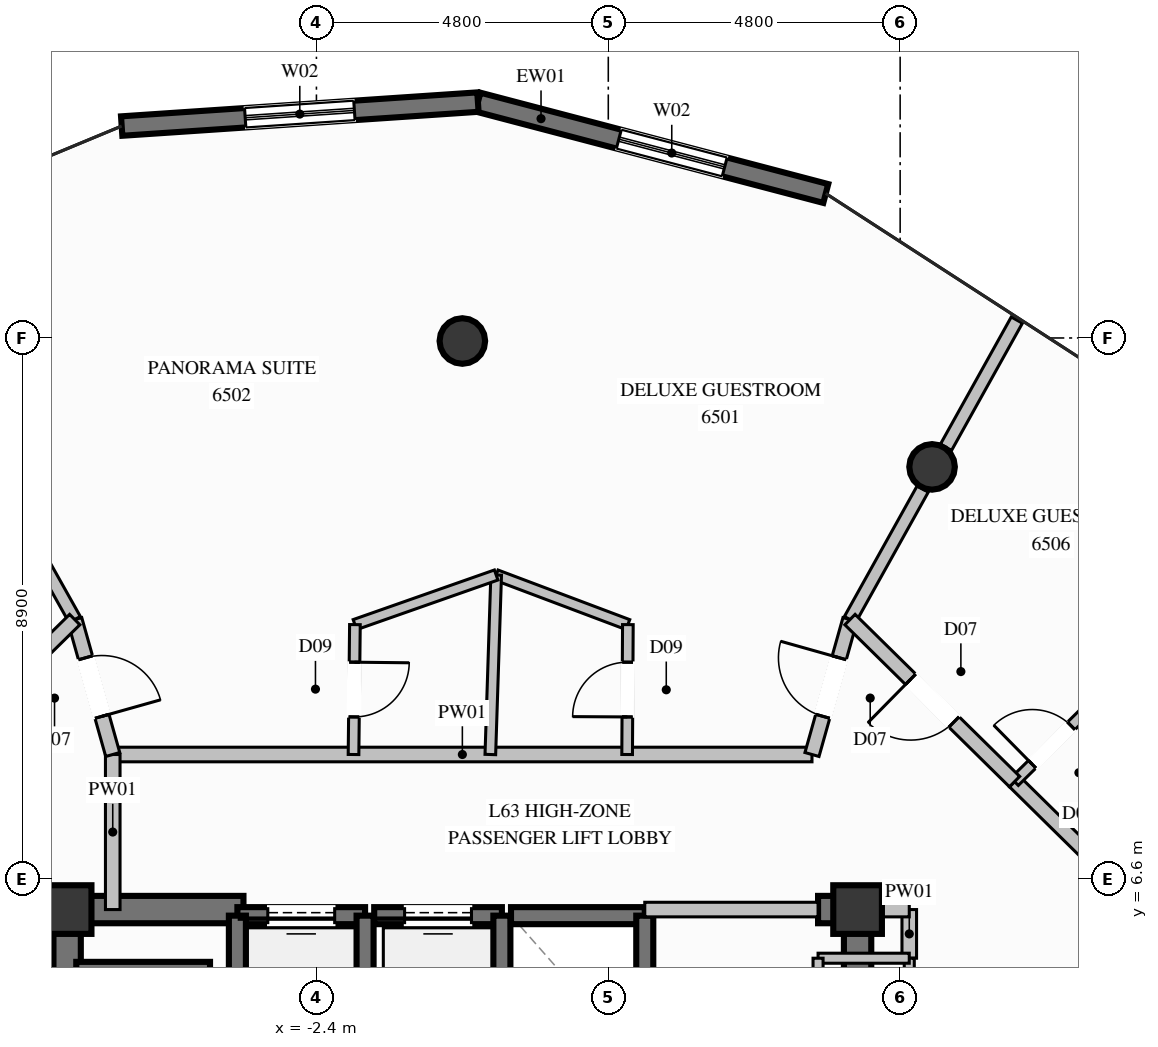
"""IFC4 building model, lengths in metres.
Left out: names, types, materials, properties, quantities, classifications, styles, units other than length and angle.
Written with IfcOpenShell. Run it as: python <this file> out.ifc"""

import sys

from ifc_helpers import new_model, si_unit, direction, frame, frame_2d, origin, origin_2d, place, context, subcontext, project, spatial, rectangle, circle, extrude, element, fill, save


model = new_model("IFC4")
c1 = context("Model", 3, precision=1e-05, world=origin(), true_north=direction((0.0, 1.0)))
c2 = subcontext(c1, "Body", "Model", "MODEL_VIEW")
j1 = project(units=[si_unit("LENGTHUNIT", "METRE"), si_unit("PLANEANGLEUNIT", "RADIAN")], contexts=[c1])
p1 = place(None, origin())
s1 = spatial("IfcSite", under=j1, at=p1, CompositionType="ELEMENT")
p2 = place(p1, origin())
s2 = spatial("IfcBuilding", under=s1, at=p2, CompositionType="ELEMENT")
p3 = place(p2, frame((0.0, 0.0, 243.0)))
s3 = spatial("IfcBuildingStorey", under=s2, at=p3, CompositionType="ELEMENT", Elevation=243.0)
for number, where, z_axis, x_axis in (
    (1, (6.5, 6.1, 0.0), (0.0, 0.0, 1.0), (1.0, 0.0, 0.0)),
    (2, (-6.5, 6.1, 0.0), (0.0, 0.0, 1.0), (1.0, 0.0, 0.0)),
):
    element("IfcColumn", number, at=place(p3, frame(where, z_axis=z_axis, x_axis=x_axis)), inside=s3, PredefinedType="COLUMN", context=c2, shape_type="SweptSolid", body=[
        extrude(rectangle(XDim=0.8, YDim=0.8, at=origin_2d()), origin(), (0.0, 0.0, 1.0), 3.8),
    ])
p4 = place(p3, frame((-6.275, 6.1, 0.0), z_axis=(0.0, 0.0, 1.0), x_axis=(1.0, 0.0, 0.0)))
e3 = element("IfcWall", 3, at=p4, inside=s3, PredefinedType="SHEAR", context=c2, shape_type="SweptSolid", body=[
    extrude(rectangle(XDim=2.675, YDim=0.45, at=frame_2d((1.337, 0.0))), origin(), (0.0, 0.0, 1.0), 3.8),
])
p5 = place(p3, frame((5.85, 6.1, 0.0), z_axis=(0.0, 0.0, 1.0), x_axis=(1.0, 0.0, 0.0)))
e4 = element("IfcWall", 4, at=p5, inside=s3, PredefinedType="SHEAR", context=c2, shape_type="SweptSolid", body=[
    extrude(rectangle(XDim=0.425, YDim=0.45, at=frame_2d((0.212, 0.0))), origin(), (0.0, 0.0, 1.0), 3.8),
])
p6 = place(p3, frame((-6.5, 2.35, 0.0), z_axis=(0.0, 0.0, 1.0), x_axis=(0.0, 1.0, 0.0)))
e5 = element("IfcWall", 5, at=p6, inside=s3, PredefinedType="SHEAR", context=c2, shape_type="SweptSolid", body=[
    extrude(rectangle(XDim=3.975, YDim=0.45, at=frame_2d((1.987, 0.0))), origin(), (0.0, 0.0, 1.0), 3.8),
])
p7 = place(p3, frame((6.5, 3.35, 0.0), z_axis=(0.0, 0.0, 1.0), x_axis=(0.0, 1.0, 0.0)))
e6 = element("IfcWall", 6, at=p7, inside=s3, PredefinedType="SHEAR", context=c2, shape_type="SweptSolid", body=[
    extrude(rectangle(XDim=2.975, YDim=0.45, at=frame_2d((1.487, 0.0))), origin(), (0.0, 0.0, 1.0), 3.8),
])
for number, where, z_axis, x_axis in (
    (7, (7.725, 13.38, 0.0), (0.0, 0.0, 1.0), (1.0, 0.0, 0.0)),
    (8, (0.0, 15.45, 0.0), (0.0, 0.0, 1.0), (1.0, 0.0, 0.0)),
):
    element("IfcColumn", number, at=place(p3, frame(where, z_axis=z_axis, x_axis=x_axis)), inside=s3, PredefinedType="COLUMN", context=c2, shape_type="SweptSolid", body=[
        extrude(circle(Radius=0.375, at=origin_2d()), origin(), (0.0, 0.0, 1.0), 3.8),
    ])
p8 = place(p3, frame((0.256, 19.379, 0.0), z_axis=(0.0, 0.0, 1.0), x_axis=(0.967181914063, -0.254084917124, 0.0)))
e9 = element("IfcWall", 9, at=p8, inside=s3, PredefinedType="SOLIDWALL", context=c2, shape_type="SweptSolid", body=[
    extrude(rectangle(XDim=5.915, YDim=0.32, at=frame_2d((2.958, 0.0))), origin(), (0.0, 0.0, 1.0), 3.57),
])
p9 = place(p8, frame((2.396, 0.0, 0.35)))
e10 = element("IfcOpeningElement", 10, at=p9, cuts=e9, PredefinedType="OPENING", context=c2, shape_type="SweptSolid", body=[
    extrude(rectangle(XDim=1.8, YDim=2.6, at=frame_2d((0.9, 1.3))), frame((0.0, 0.17, 0.0), z_axis=(0.0, -1.0, 0.0), x_axis=(1.0, 0.0, 0.0)), (0.0, 0.0, 1.0), 0.34),
])
p10 = place(p3, frame((-5.603, 18.985, 0.0), z_axis=(0.0, 0.0, 1.0), x_axis=(0.997748955427, 0.067059838539, 0.0)))
e11 = element("IfcWall", 11, at=p10, inside=s3, PredefinedType="SOLIDWALL", context=c2, shape_type="SweptSolid", body=[
    extrude(rectangle(XDim=5.872, YDim=0.32, at=frame_2d((2.936, 0.0))), origin(), (0.0, 0.0, 1.0), 3.57),
])
p11 = place(p10, frame((2.036, 0.0, 0.35)))
e12 = element("IfcOpeningElement", 12, at=p11, cuts=e11, PredefinedType="OPENING", context=c2, shape_type="SweptSolid", body=[
    extrude(rectangle(XDim=1.8, YDim=2.6, at=frame_2d((0.9, 1.3))), frame((0.0, 0.17, 0.0), z_axis=(0.0, -1.0, 0.0), x_axis=(1.0, 0.0, 0.0)), (0.0, 0.0, 1.0), 0.34),
])
p12 = place(p3, frame((-1.6, 6.0, 0.0), z_axis=(0.0, 0.0, 1.0), x_axis=(-1.0, 0.0, 0.0)))
e13 = element("IfcWall", 13, at=p12, inside=s3, PredefinedType="SOLIDWALL", context=c2, shape_type="SweptSolid", body=[
    extrude(rectangle(XDim=2.1, YDim=0.28, at=frame_2d((1.05, 0.0))), origin(), (0.0, 0.0, 1.0), 3.57),
])
p13 = place(p12, frame((0.5, 0.0, 0.0)))
e14 = element("IfcOpeningElement", 14, at=p13, cuts=e13, PredefinedType="OPENING", context=c2, shape_type="SweptSolid", body=[
    extrude(rectangle(XDim=1.1, YDim=2.2, at=frame_2d((0.55, 1.1))), frame((0.0, 0.15, 0.0), z_axis=(0.0, -1.0, 0.0), x_axis=(1.0, 0.0, 0.0)), (0.0, 0.0, 1.0), 0.3),
])
for number, where, z_axis, x_axis in (
    (15, (-3.7, 6.0, 0.0), (0.0, 0.0, 1.0), (0.0, -1.0, 0.0)),
    (16, (-1.6, 3.5, 0.0), (0.0, 0.0, 1.0), (0.0, 1.0, 0.0)),
):
    element("IfcWall", number, at=place(p3, frame(where, z_axis=z_axis, x_axis=x_axis)), inside=s3, PredefinedType="SOLIDWALL", context=c2, shape_type="SweptSolid", body=[
        extrude(rectangle(XDim=2.5, YDim=0.28, at=frame_2d((1.25, 0.0))), origin(), (0.0, 0.0, 1.0), 3.57),
    ])
p14 = place(p3, frame((0.65, 6.0, 0.0), z_axis=(0.0, 0.0, 1.0), x_axis=(-1.0, 0.0, 0.0)))
e17 = element("IfcWall", 17, at=p14, inside=s3, PredefinedType="SOLIDWALL", context=c2, shape_type="SweptSolid", body=[
    extrude(rectangle(XDim=2.1, YDim=0.28, at=frame_2d((1.05, 0.0))), origin(), (0.0, 0.0, 1.0), 3.57),
])
p15 = place(p14, frame((0.5, 0.0, 0.0)))
e18 = element("IfcOpeningElement", 18, at=p15, cuts=e17, PredefinedType="OPENING", context=c2, shape_type="SweptSolid", body=[
    extrude(rectangle(XDim=1.1, YDim=2.2, at=frame_2d((0.55, 1.1))), frame((0.0, 0.15, 0.0), z_axis=(0.0, -1.0, 0.0), x_axis=(1.0, 0.0, 0.0)), (0.0, 0.0, 1.0), 0.3),
])
p16 = place(p3, frame((0.65, 3.5, 0.0), z_axis=(0.0, 0.0, 1.0), x_axis=(0.0, 1.0, 0.0)))
e19 = element("IfcWall", 19, at=p16, inside=s3, PredefinedType="SOLIDWALL", context=c2, shape_type="SweptSolid", body=[
    extrude(rectangle(XDim=2.5, YDim=0.28, at=frame_2d((1.25, 0.0))), origin(), (0.0, 0.0, 1.0), 3.57),
])
p17 = place(p3, frame((3.0, 6.0, 0.0), z_axis=(0.0, 0.0, 1.0), x_axis=(-1.0, 0.0, 0.0)))
e20 = element("IfcWall", 20, at=p17, inside=s3, PredefinedType="SOLIDWALL", context=c2, shape_type="SweptSolid", body=[
    extrude(rectangle(XDim=2.2, YDim=0.28, at=frame_2d((1.1, 0.0))), origin(), (0.0, 0.0, 1.0), 3.57),
])
p18 = place(p3, frame((3.0, 3.5, 0.0), z_axis=(0.0, 0.0, 1.0), x_axis=(0.0, 1.0, 0.0)))
e21 = element("IfcWall", 21, at=p18, inside=s3, PredefinedType="SOLIDWALL", context=c2, shape_type="SweptSolid", body=[
    extrude(rectangle(XDim=2.5, YDim=0.28, at=frame_2d((1.25, 0.0))), origin(), (0.0, 0.0, 1.0), 3.57),
])
p19 = place(p3, frame((-4.15, 5.1, 0.0), z_axis=(0.0, 0.0, 1.0), x_axis=(-1.0, 0.0, 0.0)))
e22 = element("IfcWall", 22, at=p19, inside=s3, PredefinedType="SOLIDWALL", context=c2, shape_type="SweptSolid", body=[
    extrude(rectangle(XDim=2.2, YDim=0.28, at=frame_2d((1.1, 0.0))), origin(), (0.0, 0.0, 1.0), 3.57),
])
p20 = place(p3, frame((-5.75, 8.65, 0.0), z_axis=(0.0, 0.0, 1.0), x_axis=(1.0, 0.0, 0.0)))
e23 = element("IfcWall", 23, at=p20, inside=s3, PredefinedType="PARTITIONING", context=c2, shape_type="SweptSolid", body=[
    extrude(rectangle(XDim=11.5, YDim=0.24, at=frame_2d((5.75, 0.0))), origin(), (0.0, 0.0, 1.0), 3.57),
])
p21 = place(p3, frame((3.0, 6.1, 0.0), z_axis=(0.0, 0.0, 1.0), x_axis=(1.0, 0.0, 0.0)))
e24 = element("IfcWall", 24, at=p21, inside=s3, PredefinedType="PARTITIONING", context=c2, shape_type="SweptSolid", body=[
    extrude(rectangle(XDim=2.85, YDim=0.24, at=frame_2d((1.425, 0.0))), origin(), (0.0, 0.0, 1.0), 2.655),
])
p22 = place(p3, frame((7.35, 5.3, 0.0), z_axis=(0.0, 0.0, 1.0), x_axis=(0.0, 1.0, 0.0)))
e25 = element("IfcWall", 25, at=p22, inside=s3, PredefinedType="PARTITIONING", context=c2, shape_type="SweptSolid", body=[
    extrude(rectangle(XDim=0.8, YDim=0.24, at=frame_2d((0.4, 0.0))), origin(), (0.0, 0.0, 1.0), 2.655),
])
p23 = place(p3, frame((6.5, 6.1, 0.0), z_axis=(0.0, 0.0, 1.0), x_axis=(1.0, 0.0, 0.0)))
e26 = element("IfcWall", 26, at=p23, inside=s3, PredefinedType="PARTITIONING", context=c2, shape_type="SweptSolid", body=[
    extrude(rectangle(XDim=0.85, YDim=0.24, at=frame_2d((0.425, 0.0))), origin(), (0.0, 0.0, 1.0), 3.086),
])
p24 = place(p3, frame((-5.75, 6.1, 0.0), z_axis=(0.0, 0.0, 1.0), x_axis=(0.0, 1.0, 0.0)))
e27 = element("IfcWall", 27, at=p24, inside=s3, PredefinedType="PARTITIONING", context=c2, shape_type="SweptSolid", body=[
    extrude(rectangle(XDim=2.55, YDim=0.24, at=frame_2d((1.275, 0.0))), origin(), (0.0, 0.0, 1.0), 3.57),
])
p25 = place(p3, frame((-7.35, 6.1, 0.0), z_axis=(0.0, 0.0, 1.0), x_axis=(1.0, 0.0, 0.0)))
e28 = element("IfcWall", 28, at=p25, inside=s3, PredefinedType="PARTITIONING", context=c2, shape_type="SweptSolid", body=[
    extrude(rectangle(XDim=0.85, YDim=0.24, at=frame_2d((0.425, 0.0))), origin(), (0.0, 0.0, 1.0), 3.086),
])
p26 = place(p3, frame((7.35, 2.75, 0.0), z_axis=(0.0, 0.0, 1.0), x_axis=(0.0, 1.0, 0.0)))
e29 = element("IfcWall", 29, at=p26, inside=s3, PredefinedType="PARTITIONING", context=c2, shape_type="SweptSolid", body=[
    extrude(rectangle(XDim=2.55, YDim=0.165, at=frame_2d((1.275, 0.0))), origin(), (0.0, 0.0, 1.0), 3.57),
])
p27 = place(p26, frame((0.8, 0.0, 0.0)))
e30 = element("IfcOpeningElement", 30, at=p27, cuts=e29, PredefinedType="OPENING", context=c2, shape_type="SweptSolid", body=[
    extrude(rectangle(XDim=0.95, YDim=2.1, at=frame_2d((0.475, 1.05))), frame((0.0, 0.093, 0.0), z_axis=(0.0, -1.0, 0.0), x_axis=(1.0, 0.0, 0.0)), (0.0, 0.0, 1.0), 0.185),
])
p28 = place(p3, frame((7.35, 5.3, 0.0), z_axis=(0.0, 0.0, 1.0), x_axis=(-1.0, 0.0, 0.0)))
e31 = element("IfcWall", 31, at=p28, inside=s3, PredefinedType="PARTITIONING", context=c2, shape_type="SweptSolid", body=[
    extrude(rectangle(XDim=1.5, YDim=0.165, at=frame_2d((0.75, 0.0))), origin(), (0.0, 0.0, 1.0), 2.655),
])
p29 = place(p3, frame((5.85, 5.3, 0.0), z_axis=(0.0, 0.0, 1.0), x_axis=(0.0, -1.0, 0.0)))
e32 = element("IfcWall", 32, at=p29, inside=s3, PredefinedType="PARTITIONING", context=c2, shape_type="SweptSolid", body=[
    extrude(rectangle(XDim=2.55, YDim=0.165, at=frame_2d((1.275, 0.0))), origin(), (0.0, 0.0, 1.0), 2.655),
])
p30 = place(p3, frame((6.375, 10.869, 0.0), z_axis=(0.0, 0.0, 1.0), x_axis=(0.486620940413, 0.873613221255, 0.0)))
e33 = element("IfcWall", 33, at=p30, inside=s3, PredefinedType="PARTITIONING", context=c2, shape_type="SweptSolid", body=[
    extrude(rectangle(XDim=2.458, YDim=0.21, at=frame_2d((1.229, 0.0))), origin(), (0.0, 0.0, 1.0), 3.086),
])
p31 = place(p3, frame((7.954, 13.702, 0.0), z_axis=(0.0, 0.0, 1.0), x_axis=(0.486456485885, 0.873704805607, 0.0)))
e34 = element("IfcWall", 34, at=p31, inside=s3, PredefinedType="PARTITIONING", context=c2, shape_type="SweptSolid", body=[
    extrude(rectangle(XDim=2.395, YDim=0.21, at=frame_2d((1.197, 0.0))), origin(), (0.0, 0.0, 1.0), 3.57),
])
p32 = place(p3, frame((-6.375, 10.869, 0.0), z_axis=(0.0, 0.0, 1.0), x_axis=(-0.489667191284, 0.871909422922, 0.0)))
e35 = element("IfcWall", 35, at=p32, inside=s3, PredefinedType="PARTITIONING", context=c2, shape_type="SweptSolid", body=[
    extrude(rectangle(XDim=2.459, YDim=0.21, at=frame_2d((1.229, 0.0))), origin(), (0.0, 0.0, 1.0), 3.086),
])
p33 = place(p3, frame((0.556, 11.602, 0.0), z_axis=(0.0, 0.0, 1.0), x_axis=(0.935773181831, -0.35260254135, 0.0)))
e36 = element("IfcWall", 36, at=p33, inside=s3, PredefinedType="PLUMBINGWALL", context=c2, shape_type="SweptSolid", body=[
    extrude(rectangle(XDim=2.315, YDim=0.175, at=frame_2d((1.157, 0.0))), origin(), (0.0, 0.0, 1.0), 3.252),
])
p34 = place(p3, frame((0.556, 11.602, 0.0), z_axis=(0.0, 0.0, 1.0), x_axis=(-0.032483675207, -0.999472266171, 0.0)))
e37 = element("IfcWall", 37, at=p34, inside=s3, PredefinedType="PLUMBINGWALL", context=c2, shape_type="SweptSolid", body=[
    extrude(rectangle(XDim=2.954, YDim=0.175, at=frame_2d((1.477, 0.0))), origin(), (0.0, 0.0, 1.0), 3.57),
])
p35 = place(p3, frame((2.71, 8.65, 0.0), z_axis=(0.0, 0.0, 1.0), x_axis=(0.005600552237, 0.999984316784, 0.0)))
e38 = element("IfcWall", 38, at=p35, inside=s3, PredefinedType="PLUMBINGWALL", context=c2, shape_type="SweptSolid", body=[
    extrude(rectangle(XDim=2.136, YDim=0.175, at=frame_2d((1.068, 0.0))), origin(), (0.0, 0.0, 1.0), 3.57),
])
p36 = place(p35, frame((0.618, 0.0, 0.0)))
e39 = element("IfcOpeningElement", 39, at=p36, cuts=e38, PredefinedType="OPENING", context=c2, shape_type="SweptSolid", body=[
    extrude(rectangle(XDim=0.9, YDim=2.1, at=frame_2d((0.45, 1.05))), frame((0.0, 0.098, 0.0), z_axis=(0.0, -1.0, 0.0), x_axis=(1.0, 0.0, 0.0)), (0.0, 0.0, 1.0), 0.195),
])
p37 = place(p3, frame((5.75, 8.65, 0.0), z_axis=(0.0, 0.0, 1.0), x_axis=(0.271110513922, 0.962548226969, 0.0)))
e40 = element("IfcWall", 40, at=p37, inside=s3, PredefinedType="PARTITIONING", context=c2, shape_type="SweptSolid", body=[
    extrude(rectangle(XDim=2.305, YDim=0.24, at=frame_2d((1.153, 0.0))), origin(), (0.0, 0.0, 1.0), 3.57),
])
p38 = place(p37, frame((0.653, 0.0, 0.0)))
e41 = element("IfcOpeningElement", 41, at=p38, cuts=e40, PredefinedType="OPENING", context=c2, shape_type="SweptSolid", body=[
    extrude(rectangle(XDim=1.0, YDim=2.2, at=frame_2d((0.5, 1.1))), frame((0.0, 0.13, 0.0), z_axis=(0.0, -1.0, 0.0), x_axis=(1.0, 0.0, 0.0)), (0.0, 0.0, 1.0), 0.26),
])
p39 = place(p3, frame((-1.767, 10.786, 0.0), z_axis=(0.0, 0.0, 1.0), x_axis=(0.943463492061, 0.331476453385, 0.0)))
e42 = element("IfcWall", 42, at=p39, inside=s3, PredefinedType="PLUMBINGWALL", context=c2, shape_type="SweptSolid", body=[
    extrude(rectangle(XDim=2.462, YDim=0.175, at=frame_2d((1.231, 0.0))), origin(), (0.0, 0.0, 1.0), 3.252),
])
p40 = place(p3, frame((-1.767, 10.786, 0.0), z_axis=(0.0, 0.0, 1.0), x_axis=(-0.010743464968, -0.999942287315, 0.0)))
e43 = element("IfcWall", 43, at=p40, inside=s3, PredefinedType="PLUMBINGWALL", context=c2, shape_type="SweptSolid", body=[
    extrude(rectangle(XDim=2.136, YDim=0.175, at=frame_2d((1.068, 0.0))), origin(), (0.0, 0.0, 1.0), 3.57),
])
p41 = place(p40, frame((0.618, 0.0, 0.0)))
e44 = element("IfcOpeningElement", 44, at=p41, cuts=e43, PredefinedType="OPENING", context=c2, shape_type="SweptSolid", body=[
    extrude(rectangle(XDim=0.9, YDim=2.1, at=frame_2d((0.45, 1.05))), frame((0.0, 0.098, 0.0), z_axis=(0.0, -1.0, 0.0), x_axis=(1.0, 0.0, 0.0)), (0.0, 0.0, 1.0), 0.195),
])
p42 = place(p3, frame((-6.375, 10.869, 0.0), z_axis=(0.0, 0.0, 1.0), x_axis=(0.271110513922, -0.962548226969, 0.0)))
e45 = element("IfcWall", 45, at=p42, inside=s3, PredefinedType="PARTITIONING", context=c2, shape_type="SweptSolid", body=[
    extrude(rectangle(XDim=2.305, YDim=0.24, at=frame_2d((1.153, 0.0))), origin(), (0.0, 0.0, 1.0), 3.57),
])
p43 = place(p42, frame((0.653, 0.0, 0.0)))
e46 = element("IfcOpeningElement", 46, at=p43, cuts=e45, PredefinedType="OPENING", context=c2, shape_type="SweptSolid", body=[
    extrude(rectangle(XDim=1.0, YDim=2.2, at=frame_2d((0.5, 1.1))), frame((0.0, 0.13, 0.0), z_axis=(0.0, -1.0, 0.0), x_axis=(1.0, 0.0, 0.0)), (0.0, 0.0, 1.0), 0.26),
])
p44 = place(p3, frame((-6.375, 10.869, 0.0), z_axis=(0.0, 0.0, 1.0), x_axis=(-0.712721806089, -0.701446809904, 0.0)))
e47 = element("IfcWall", 47, at=p44, inside=s3, PredefinedType="PARTITIONING", context=c2, shape_type="SweptSolid", body=[
    extrude(rectangle(XDim=2.75, YDim=0.24, at=frame_2d((1.375, 0.0))), origin(), (0.0, 0.0, 1.0), 3.57),
])
p45 = place(p3, frame((11.042, 6.275, 0.0), z_axis=(0.0, 0.0, 1.0), x_axis=(-0.712677423321, 0.701491903224, 0.0)))
e48 = element("IfcWall", 48, at=p45, inside=s3, PredefinedType="PARTITIONING", context=c2, shape_type="SweptSolid", body=[
    extrude(rectangle(XDim=2.75, YDim=0.24, at=frame_2d((1.375, 0.0))), origin(), (0.0, 0.0, 1.0), 3.57),
])
p46 = place(p3, frame((9.082, 8.204, 0.0), z_axis=(0.0, 0.0, 1.0), x_axis=(0.712642440828, 0.701527441751, 0.0)))
e49 = element("IfcWall", 49, at=p46, inside=s3, PredefinedType="PLUMBINGWALL", context=c2, shape_type="SweptSolid", body=[
    extrude(rectangle(XDim=1.713, YDim=0.175, at=frame_2d((0.857, 0.0))), origin(), (0.0, 0.0, 1.0), 3.57),
])
p47 = place(p46, frame((0.407, 0.0, 0.0)))
e50 = element("IfcOpeningElement", 50, at=p47, cuts=e49, PredefinedType="OPENING", context=c2, shape_type="SweptSolid", body=[
    extrude(rectangle(XDim=0.9, YDim=2.1, at=frame_2d((0.45, 1.05))), frame((0.0, 0.098, 0.0), z_axis=(0.0, -1.0, 0.0), x_axis=(1.0, 0.0, 0.0)), (0.0, 0.0, 1.0), 0.195),
])
p48 = place(p3, frame((9.082, 8.204, 0.0), z_axis=(0.0, 0.0, 1.0), x_axis=(-0.712644426178, 0.70152542494, 0.0)))
e51 = element("IfcWall", 51, at=p48, inside=s3, PredefinedType="PARTITIONING", context=c2, shape_type="SweptSolid", body=[
    extrude(rectangle(XDim=3.799, YDim=0.24, at=frame_2d((1.899, 0.0))), origin(), (0.0, 0.0, 1.0), 3.57),
])
p49 = place(p48, frame((1.399, 0.0, 0.0)))
e52 = element("IfcOpeningElement", 52, at=p49, cuts=e51, PredefinedType="OPENING", context=c2, shape_type="SweptSolid", body=[
    extrude(rectangle(XDim=1.0, YDim=2.2, at=frame_2d((0.5, 1.1))), frame((0.0, 0.13, 0.0), z_axis=(0.0, -1.0, 0.0), x_axis=(1.0, 0.0, 0.0)), (0.0, 0.0, 1.0), 0.26),
])
p50 = place(p9, origin())
e53 = element("IfcWindow", 53, at=p50, inside=s3, PartitioningType="SINGLE_PANEL", PredefinedType="WINDOW", context=c2, shape_type="SweptSolid", body=[
    extrude(rectangle(XDim=1.8, YDim=2.6, at=frame_2d((0.9, 1.3))), frame((0.0, 0.03, 0.0), z_axis=(0.0, -1.0, 0.0), x_axis=(1.0, 0.0, 0.0)), (0.0, 0.0, 1.0), 0.06),
])
fill(e10, e53)
p51 = place(p11, origin())
e54 = element("IfcWindow", 54, at=p51, inside=s3, PartitioningType="SINGLE_PANEL", PredefinedType="WINDOW", context=c2, shape_type="SweptSolid", body=[
    extrude(rectangle(XDim=1.8, YDim=2.6, at=frame_2d((0.9, 1.3))), frame((0.0, 0.03, 0.0), z_axis=(0.0, -1.0, 0.0), x_axis=(1.0, 0.0, 0.0)), (0.0, 0.0, 1.0), 0.06),
])
fill(e12, e54)
p52 = place(p13, origin())
e55 = element("IfcDoor", 55, at=p52, inside=s3, OperationType="SLIDING_TO_LEFT", PredefinedType="DOOR", context=c2, shape_type="SweptSolid", body=[
    extrude(rectangle(XDim=1.1, YDim=2.2, at=frame_2d((0.55, 1.1))), frame((0.0, 0.025, 0.0), z_axis=(0.0, -1.0, 0.0), x_axis=(1.0, 0.0, 0.0)), (0.0, 0.0, 1.0), 0.05),
])
fill(e14, e55)
p53 = place(p15, origin())
e56 = element("IfcDoor", 56, at=p53, inside=s3, OperationType="SLIDING_TO_LEFT", PredefinedType="DOOR", context=c2, shape_type="SweptSolid", body=[
    extrude(rectangle(XDim=1.1, YDim=2.2, at=frame_2d((0.55, 1.1))), frame((0.0, 0.025, 0.0), z_axis=(0.0, -1.0, 0.0), x_axis=(1.0, 0.0, 0.0)), (0.0, 0.0, 1.0), 0.05),
])
fill(e18, e56)
p54 = place(p36, origin())
e57 = element("IfcDoor", 57, at=p54, inside=s3, OperationType="SINGLE_SWING_LEFT", PredefinedType="DOOR", context=c2, shape_type="SweptSolid", body=[
    extrude(rectangle(XDim=0.9, YDim=2.1, at=frame_2d((0.45, 1.05))), frame((0.0, 0.025, 0.0), z_axis=(0.0, -1.0, 0.0), x_axis=(1.0, 0.0, 0.0)), (0.0, 0.0, 1.0), 0.05),
])
fill(e39, e57)
p55 = place(p38, origin())
e58 = element("IfcDoor", 58, at=p55, inside=s3, OperationType="SINGLE_SWING_RIGHT", PredefinedType="DOOR", context=c2, shape_type="SweptSolid", body=[
    extrude(rectangle(XDim=1.0, YDim=2.2, at=frame_2d((0.5, 1.1))), frame((0.0, 0.025, 0.0), z_axis=(0.0, -1.0, 0.0), x_axis=(1.0, 0.0, 0.0)), (0.0, 0.0, 1.0), 0.05),
])
fill(e41, e58)
p56 = place(p41, origin())
e59 = element("IfcDoor", 59, at=p56, inside=s3, OperationType="SINGLE_SWING_LEFT", PredefinedType="DOOR", context=c2, shape_type="SweptSolid", body=[
    extrude(rectangle(XDim=0.9, YDim=2.1, at=frame_2d((0.45, 1.05))), frame((0.0, 0.025, 0.0), z_axis=(0.0, -1.0, 0.0), x_axis=(1.0, 0.0, 0.0)), (0.0, 0.0, 1.0), 0.05),
])
fill(e44, e59)
p57 = place(p43, origin())
e60 = element("IfcDoor", 60, at=p57, inside=s3, OperationType="SINGLE_SWING_RIGHT", PredefinedType="DOOR", context=c2, shape_type="SweptSolid", body=[
    extrude(rectangle(XDim=1.0, YDim=2.2, at=frame_2d((0.5, 1.1))), frame((0.0, 0.025, 0.0), z_axis=(0.0, -1.0, 0.0), x_axis=(1.0, 0.0, 0.0)), (0.0, 0.0, 1.0), 0.05),
])
fill(e46, e60)
p58 = place(p47, origin())
e61 = element("IfcDoor", 61, at=p58, inside=s3, OperationType="SINGLE_SWING_LEFT", PredefinedType="DOOR", context=c2, shape_type="SweptSolid", body=[
    extrude(rectangle(XDim=0.9, YDim=2.1, at=frame_2d((0.45, 1.05))), frame((0.0, 0.025, 0.0), z_axis=(0.0, -1.0, 0.0), x_axis=(1.0, 0.0, 0.0)), (0.0, 0.0, 1.0), 0.05),
])
fill(e50, e61)
p59 = place(p49, origin())
e62 = element("IfcDoor", 62, at=p59, inside=s3, OperationType="SINGLE_SWING_RIGHT", PredefinedType="DOOR", context=c2, shape_type="SweptSolid", body=[
    extrude(rectangle(XDim=1.0, YDim=2.2, at=frame_2d((0.5, 1.1))), frame((0.0, 0.025, 0.0), z_axis=(0.0, -1.0, 0.0), x_axis=(1.0, 0.0, 0.0)), (0.0, 0.0, 1.0), 0.05),
])
fill(e52, e62)
save(model, sys.argv[1])
